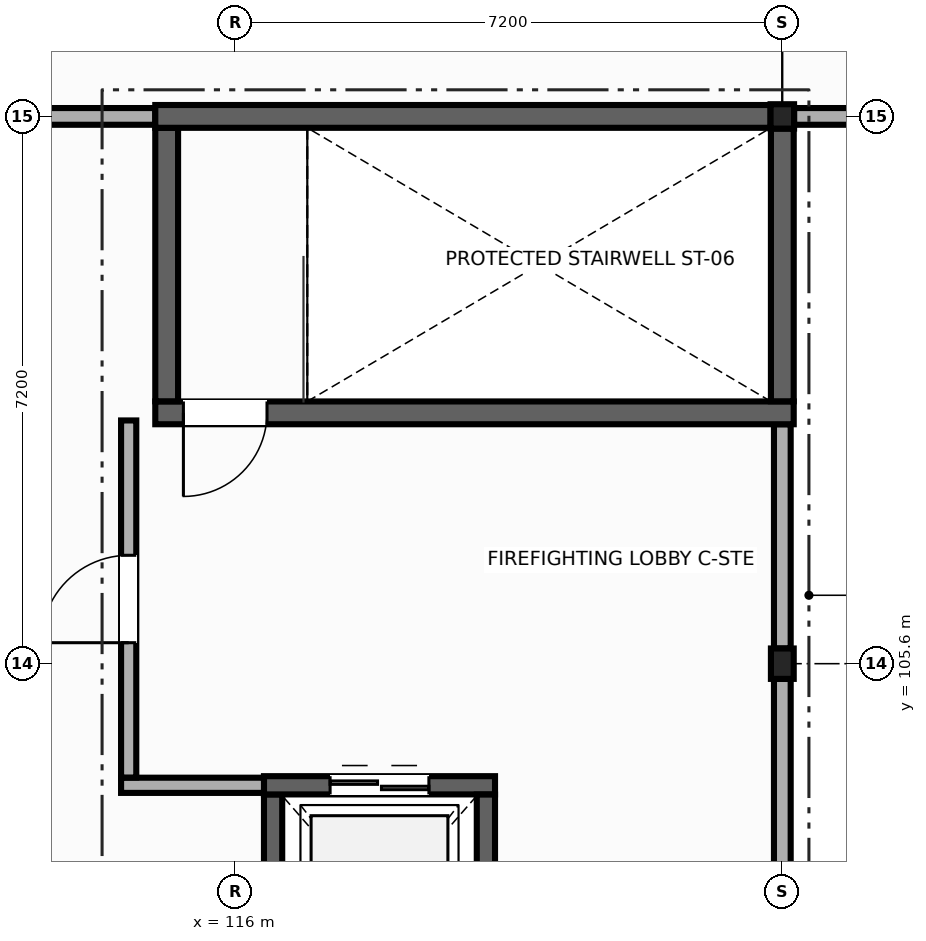
"""IFC4 building model, lengths in metres.
Left out: names, types, materials, properties, quantities, classifications, styles, units other than length and angle.
Written with IfcOpenShell. Run it as: python <this file> out.ifc"""

import sys

from ifc_helpers import new_model, si_unit, direction, frame, frame_2d, origin, origin_2d, place, context, subcontext, project, spatial, rectangle, i_section, extrude, element, fill, save


model = new_model("IFC4")
c1 = context("Model", 3, precision=1e-05, world=origin(), true_north=direction((0.0, 1.0)))
c2 = subcontext(c1, "Body", "Model", "MODEL_VIEW")
j1 = project(units=[si_unit("LENGTHUNIT", "METRE"), si_unit("PLANEANGLEUNIT", "RADIAN")], contexts=[c1])
p1 = place(None, origin())
s1 = spatial("IfcSite", under=j1, at=p1, CompositionType="ELEMENT")
p2 = place(p1, origin())
s2 = spatial("IfcBuilding", under=s1, at=p2, CompositionType="ELEMENT")
p3 = place(p2, frame((0.0, 0.0, 23.1)))
s3 = spatial("IfcBuildingStorey", under=s2, at=p3, CompositionType="ELEMENT", Elevation=23.1)
p4 = place(p3, frame((123.2, 105.6, 0.0), z_axis=(0.0, 0.0, 1.0), x_axis=(1.0, 0.0, 0.0)))
e1 = element("IfcColumn", 1, at=p4, inside=s3, PredefinedType="COLUMN", context=c2, shape_type="SweptSolid", body=[
    extrude(i_section(OverallWidth=0.3, OverallDepth=0.4, WebThickness=0.013, FlangeThickness=0.024, at=origin_2d()), origin(), (0.0, 0.0, 1.0), 4.2),
])
p5 = place(p3, frame((123.2, 112.8, 0.0), z_axis=(0.0, 0.0, 1.0), x_axis=(1.0, 0.0, 0.0)))
e2 = element("IfcColumn", 2, at=p5, inside=s3, PredefinedType="COLUMN", context=c2, shape_type="SweptSolid", body=[
    extrude(i_section(OverallWidth=0.309, OverallDepth=0.321, WebThickness=0.014, FlangeThickness=0.022, at=origin_2d()), origin(), (0.0, 0.0, 1.0), 4.2),
])
p6 = place(p3, frame((109.0, 112.8, 0.0), z_axis=(0.0, 0.0, 1.0), x_axis=(1.0, 0.0, 0.0)))
e3 = element("IfcWall", 3, at=p6, inside=s3, PredefinedType="SOLIDWALL", context=c2, shape_type="SweptSolid", body=[
    extrude(rectangle(XDim=5.95, YDim=0.22, at=frame_2d((2.975, 0.0))), origin(), (0.0, 0.0, 1.0), 4.046),
])
p7 = place(p6, frame((2.425, 0.0, 0.0)))
e4 = element("IfcOpeningElement", 4, at=p7, cuts=e3, PredefinedType="OPENING", context=c2, shape_type="SweptSolid", body=[
    extrude(rectangle(XDim=1.1, YDim=2.15, at=frame_2d((0.55, 1.075))), frame((0.0, 0.12, 0.0), z_axis=(0.0, -1.0, 0.0), x_axis=(1.0, 0.0, 0.0)), (0.0, 0.0, 1.0), 0.24),
])
p8 = place(p3, frame((123.2, 108.75, 0.0), z_axis=(0.0, 0.0, 1.0), x_axis=(0.0, -1.0, 0.0)))
e5 = element("IfcWall", 5, at=p8, inside=s3, PredefinedType="SOLIDWALL", context=c2, shape_type="SweptSolid", body=[
    extrude(rectangle(XDim=2.95, YDim=0.22, at=frame_2d((1.475, 0.0))), origin(), (0.0, 0.0, 1.0), 4.2),
])
p9 = place(p3, frame((123.2, 105.4, 0.0), z_axis=(0.0, 0.0, 1.0), x_axis=(0.0, -1.0, 0.0)))
e6 = element("IfcWall", 6, at=p9, inside=s3, PredefinedType="SOLIDWALL", context=c2, shape_type="SweptSolid", body=[
    extrude(rectangle(XDim=6.85, YDim=0.22, at=frame_2d((3.425, 0.0))), origin(), (0.0, 0.0, 1.0), 4.2),
])
p10 = place(p3, frame((130.1, 112.8, 0.0), z_axis=(0.0, 0.0, 1.0), x_axis=(-1.0, 0.0, 0.0)))
e7 = element("IfcWall", 7, at=p10, inside=s3, PredefinedType="SOLIDWALL", context=c2, shape_type="SweptSolid", body=[
    extrude(rectangle(XDim=6.746, YDim=0.22, at=frame_2d((3.373, 0.0))), origin(), (0.0, 0.0, 1.0), 4.046),
])
p11 = place(p10, frame((2.473, 0.0, 0.85)))
e8 = element("IfcOpeningElement", 8, at=p11, cuts=e7, PredefinedType="OPENING", context=c2, shape_type="SweptSolid", body=[
    extrude(rectangle(XDim=1.8, YDim=1.2, at=frame_2d((0.9, 0.6))), frame((0.0, 0.12, 0.0), z_axis=(0.0, -1.0, 0.0), x_axis=(1.0, 0.0, 0.0)), (0.0, 0.0, 1.0), 0.24),
])
p12 = place(p3, frame((123.35, 108.9, 0.0), z_axis=(0.0, 0.0, 1.0), x_axis=(-1.0, 0.0, 0.0)))
e9 = element("IfcWall", 9, at=p12, inside=s3, PredefinedType="SHEAR", context=c2, shape_type="SweptSolid", body=[
    extrude(rectangle(XDim=8.4, YDim=0.3, at=frame_2d((4.2, 0.0))), origin(), (0.0, 0.0, 1.0), 3.88),
])
p13 = place(p12, frame((6.93, 0.0, 0.0)))
e10 = element("IfcOpeningElement", 10, at=p13, cuts=e9, PredefinedType="OPENING", context=c2, shape_type="SweptSolid", body=[
    extrude(rectangle(XDim=1.1, YDim=2.15, at=frame_2d((0.55, 1.075))), frame((0.0, 0.16, 0.0), z_axis=(0.0, -1.0, 0.0), x_axis=(1.0, 0.0, 0.0)), (0.0, 0.0, 1.0), 0.32),
])
p14 = place(p3, frame((115.1, 109.052, 0.0), z_axis=(0.0, 0.0, 1.0), x_axis=(0.0, 1.0, 0.0)))
e11 = element("IfcWall", 11, at=p14, inside=s3, PredefinedType="SHEAR", context=c2, shape_type="SweptSolid", body=[
    extrude(rectangle(XDim=3.598, YDim=0.3, at=frame_2d((1.799, 0.0))), origin(), (0.0, 0.0, 1.0), 3.88),
])
p15 = place(p3, frame((114.95, 112.8, 0.0), z_axis=(0.0, 0.0, 1.0), x_axis=(1.0, 0.0, 0.0)))
e12 = element("IfcWall", 12, at=p15, inside=s3, PredefinedType="SHEAR", context=c2, shape_type="SweptSolid", body=[
    extrude(rectangle(XDim=8.095, YDim=0.3, at=frame_2d((4.048, 0.0))), origin(), (0.0, 0.0, 1.0), 3.88),
])
p16 = place(p3, frame((123.2, 112.64, 0.0), z_axis=(0.0, 0.0, 1.0), x_axis=(0.0, -1.0, 0.0)))
e13 = element("IfcWall", 13, at=p16, inside=s3, PredefinedType="SHEAR", context=c2, shape_type="SweptSolid", body=[
    extrude(rectangle(XDim=3.588, YDim=0.3, at=frame_2d((1.794, 0.0))), origin(), (0.0, 0.0, 1.0), 3.88),
])
p17 = place(p3, frame((116.5, 100.922, 0.0), z_axis=(0.0, 0.0, 1.0), x_axis=(0.0, 1.0, 0.0)))
e14 = element("IfcWall", 14, at=p17, inside=s3, PredefinedType="SHEAR", context=c2, shape_type="SweptSolid", body=[
    extrude(rectangle(XDim=2.958, YDim=0.24, at=frame_2d((1.479, 0.0))), origin(), (0.0, 0.0, 1.0), 3.88),
])
p18 = place(p3, frame((116.38, 104.0, 0.0), z_axis=(0.0, 0.0, 1.0), x_axis=(1.0, 0.0, 0.0)))
e15 = element("IfcWall", 15, at=p18, inside=s3, PredefinedType="SHEAR", context=c2, shape_type="SweptSolid", body=[
    extrude(rectangle(XDim=3.04, YDim=0.24, at=frame_2d((1.52, 0.0))), origin(), (0.0, 0.0, 1.0), 3.88),
])
p19 = place(p18, frame((0.87, 0.0, 0.0)))
e16 = element("IfcOpeningElement", 16, at=p19, cuts=e15, PredefinedType="OPENING", context=c2, shape_type="SweptSolid", body=[
    extrude(rectangle(XDim=1.3, YDim=2.15, at=frame_2d((0.65, 1.075))), frame((0.0, 0.13, 0.0), z_axis=(0.0, -1.0, 0.0), x_axis=(1.0, 0.0, 0.0)), (0.0, 0.0, 1.0), 0.26),
])
p20 = place(p3, frame((119.3, 103.878, 0.0), z_axis=(0.0, 0.0, 1.0), x_axis=(0.0, -1.0, 0.0)))
e17 = element("IfcWall", 17, at=p20, inside=s3, PredefinedType="SHEAR", context=c2, shape_type="SweptSolid", body=[
    extrude(rectangle(XDim=2.956, YDim=0.24, at=frame_2d((1.478, 0.0))), origin(), (0.0, 0.0, 1.0), 3.88),
])
p21 = place(p3, frame((116.38, 104.0, 0.0), z_axis=(0.0, 0.0, 1.0), x_axis=(-1.0, 0.0, 0.0)))
e18 = element("IfcWall", 18, at=p21, inside=s3, PredefinedType="PARTITIONING", context=c2, shape_type="SweptSolid", body=[
    extrude(rectangle(XDim=1.88, YDim=0.2, at=frame_2d((0.94, 0.0))), origin(), (0.0, 0.0, 1.0), 3.88),
])
p22 = place(p3, frame((114.6, 104.102, 0.0), z_axis=(0.0, 0.0, 1.0), x_axis=(0.0, 1.0, 0.0)))
e19 = element("IfcWall", 19, at=p22, inside=s3, PredefinedType="PARTITIONING", context=c2, shape_type="SweptSolid", body=[
    extrude(rectangle(XDim=4.698, YDim=0.2, at=frame_2d((2.349, 0.0))), origin(), (0.0, 0.0, 1.0), 3.88),
])
p23 = place(p22, frame((1.774, 0.0, 0.0)))
e20 = element("IfcOpeningElement", 20, at=p23, cuts=e19, PredefinedType="OPENING", context=c2, shape_type="SweptSolid", body=[
    extrude(rectangle(XDim=1.15, YDim=2.15, at=frame_2d((0.575, 1.075))), frame((0.0, 0.11, 0.0), z_axis=(0.0, -1.0, 0.0), x_axis=(1.0, 0.0, 0.0)), (0.0, 0.0, 1.0), 0.22),
])
p24 = place(p13, origin())
e21 = element("IfcDoor", 21, at=p24, inside=s3, OperationType="SINGLE_SWING_RIGHT", PredefinedType="DOOR", context=c2, shape_type="SweptSolid", body=[
    extrude(rectangle(XDim=1.1, YDim=2.15, at=frame_2d((0.55, 1.075))), frame((0.0, 0.025, 0.0), z_axis=(0.0, -1.0, 0.0), x_axis=(1.0, 0.0, 0.0)), (0.0, 0.0, 1.0), 0.05),
])
fill(e10, e21)
p25 = place(p19, origin())
e22 = element("IfcDoor", 22, at=p25, inside=s3, OperationType="DOUBLE_DOOR_SLIDING", PredefinedType="DOOR", context=c2, shape_type="SweptSolid", body=[
    extrude(rectangle(XDim=1.3, YDim=2.15, at=frame_2d((0.65, 1.075))), frame((0.0, 0.025, 0.0), z_axis=(0.0, -1.0, 0.0), x_axis=(1.0, 0.0, 0.0)), (0.0, 0.0, 1.0), 0.05),
])
fill(e16, e22)
p26 = place(p23, origin())
e23 = element("IfcDoor", 23, at=p26, inside=s3, OperationType="SINGLE_SWING_LEFT", PredefinedType="DOOR", context=c2, shape_type="SweptSolid", body=[
    extrude(rectangle(XDim=1.15, YDim=2.15, at=frame_2d((0.575, 1.075))), frame((0.0, 0.025, 0.0), z_axis=(0.0, -1.0, 0.0), x_axis=(1.0, 0.0, 0.0)), (0.0, 0.0, 1.0), 0.05),
])
fill(e20, e23)
save(model, sys.argv[1])
